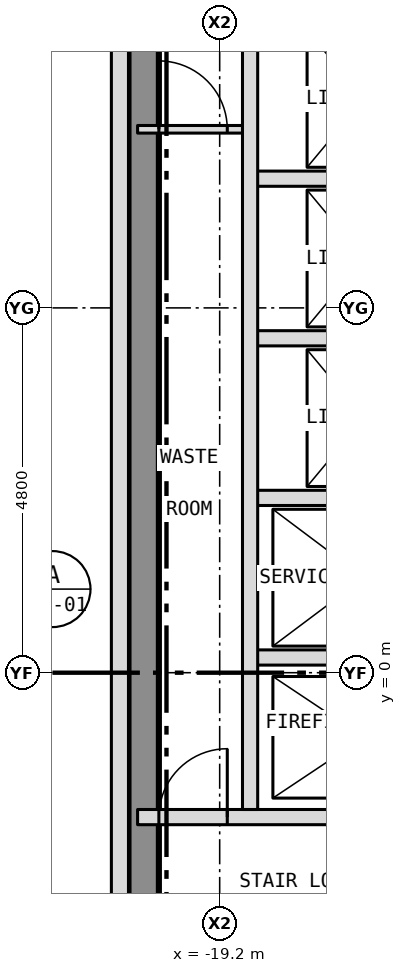
"""IFC4 building model, lengths in metres.
Left out: names, types, materials, properties, quantities, classifications, styles, units other than length and angle.
Written with IfcOpenShell. Run it as: python <this file> out.ifc"""

import sys

from ifc_helpers import new_model, si_unit, direction, frame, frame_2d, origin, place, context, subcontext, project, spatial, rectangle, extrude, element, fill, save


model = new_model("IFC4")
c1 = context("Model", 3, precision=1e-05, world=origin(), true_north=direction((0.0, 1.0)))
c2 = subcontext(c1, "Body", "Model", "MODEL_VIEW")
j1 = project(units=[si_unit("LENGTHUNIT", "METRE"), si_unit("PLANEANGLEUNIT", "RADIAN")], contexts=[c1])
p1 = place(None, origin())
s1 = spatial("IfcSite", under=j1, at=p1, CompositionType="ELEMENT")
p2 = place(p1, origin())
s2 = spatial("IfcBuilding", under=s1, at=p2, CompositionType="ELEMENT")
p3 = place(p2, frame((0.0, 0.0, 265.5)))
s3 = spatial("IfcBuildingStorey", under=s2, at=p3, CompositionType="ELEMENT", Elevation=265.5)
p4 = place(p3, frame((-20.2, -10.8, 0.0), z_axis=(0.0, 0.0, 1.0), x_axis=(0.0, 1.0, 0.0)))
e1 = element("IfcWall", 1, at=p4, inside=s3, PredefinedType="SHEAR", context=c2, shape_type="SweptSolid", body=[
    extrude(rectangle(XDim=21.6, YDim=0.4, at=frame_2d((10.8, 0.0))), origin(), (0.0, 0.0, 1.0), 3.25),
])
p5 = place(p3, frame((-20.512, 11.15, 0.0), z_axis=(0.0, 0.0, 1.0), x_axis=(0.0, -1.0, 0.0)))
e2 = element("IfcWall", 2, at=p5, inside=s3, PredefinedType="SOLIDWALL", context=c2, shape_type="SweptSolid", body=[
    extrude(rectangle(XDim=22.3, YDim=0.225, at=frame_2d((11.15, 0.0))), origin(), (0.0, 0.0, 1.0), 3.5),
])
p6 = place(p5, frame((18.4, 0.0, 1.0)))
e3 = element("IfcOpeningElement", 3, at=p6, cuts=e2, PredefinedType="OPENING", context=c2, shape_type="SweptSolid", body=[
    extrude(rectangle(XDim=0.6, YDim=1.5, at=frame_2d((0.3, 0.75))), frame((0.0, 0.125, 0.0), z_axis=(0.0, -1.0, 0.0), x_axis=(1.0, 0.0, 0.0)), (0.0, 0.0, 1.0), 0.249),
])
p7 = place(p3, frame((-20.28, -1.9, 0.0), z_axis=(0.0, 0.0, 1.0), x_axis=(1.0, 0.0, 0.0)))
e4 = element("IfcWall", 4, at=p7, inside=s3, PredefinedType="PARTITIONING", context=c2, shape_type="SweptSolid", body=[
    extrude(rectangle(XDim=4.36, YDim=0.2, at=frame_2d((2.18, 0.0))), origin(), (0.0, 0.0, 1.0), 3.25),
])
p8 = place(p7, frame((0.28, 0.0, 0.0)))
e5 = element("IfcOpeningElement", 5, at=p8, cuts=e4, PredefinedType="OPENING", context=c2, shape_type="SweptSolid", body=[
    extrude(rectangle(XDim=0.9, YDim=2.1, at=frame_2d((0.45, 1.05))), frame((0.0, 0.112, 0.0), z_axis=(0.0, -1.0, 0.0), x_axis=(1.0, 0.0, 0.0)), (0.0, 0.0, 1.0), 0.224),
])
for number, where, z_axis, x_axis in (
    (6, (-18.8, 0.2, 0.0), (0.0, 0.0, 1.0), (1.0, 0.0, 0.0)),
    (7, (-18.8, 2.3, 0.0), (0.0, 0.0, 1.0), (1.0, 0.0, 0.0)),
    (8, (-18.8, 4.4, 0.0), (0.0, 0.0, 1.0), (1.0, 0.0, 0.0)),
    (9, (-18.8, 6.5, 0.0), (0.0, 0.0, 1.0), (1.0, 0.0, 0.0)),
):
    element("IfcWall", number, at=place(p3, frame(where, z_axis=z_axis, x_axis=x_axis)), inside=s3, PredefinedType="PARTITIONING", context=c2, shape_type="SweptSolid", body=[
        extrude(rectangle(XDim=2.88, YDim=0.2, at=frame_2d((1.44, 0.0))), origin(), (0.0, 0.0, 1.0), 3.25),
    ])
p9 = place(p3, frame((-20.28, 7.15, 0.0), z_axis=(0.0, 0.0, 1.0), x_axis=(1.0, 0.0, 0.0)))
e10 = element("IfcWall", 10, at=p9, inside=s3, PredefinedType="PARTITIONING", context=c2, shape_type="SweptSolid", body=[
    extrude(rectangle(XDim=1.48, YDim=0.1, at=frame_2d((0.74, 0.0))), origin(), (0.0, 0.0, 1.0), 3.25),
])
p10 = place(p9, frame((0.28, 0.0, 0.0)))
e11 = element("IfcOpeningElement", 11, at=p10, cuts=e10, PredefinedType="OPENING", context=c2, shape_type="SweptSolid", body=[
    extrude(rectangle(XDim=0.9, YDim=2.1, at=frame_2d((0.45, 1.05))), frame((0.0, 0.062, 0.0), z_axis=(0.0, -1.0, 0.0), x_axis=(1.0, 0.0, 0.0)), (0.0, 0.0, 1.0), 0.124),
])
p11 = place(p3, frame((-18.8, -1.8, 0.0), z_axis=(0.0, 0.0, 1.0), x_axis=(0.0, 1.0, 0.0)))
e12 = element("IfcWall", 12, at=p11, inside=s3, PredefinedType="PARTITIONING", context=c2, shape_type="SweptSolid", body=[
    extrude(rectangle(XDim=12.48, YDim=0.2, at=frame_2d((6.24, 0.0))), origin(), (0.0, 0.0, 1.0), 3.25),
])
p12 = place(p8, origin())
e13 = element("IfcDoor", 13, at=p12, inside=s3, OperationType="SINGLE_SWING_RIGHT", PredefinedType="DOOR", context=c2, shape_type="SweptSolid", body=[
    extrude(rectangle(XDim=0.9, YDim=2.1, at=frame_2d((0.45, 1.05))), frame((0.0, 0.025, 0.0), z_axis=(0.0, -1.0, 0.0), x_axis=(1.0, 0.0, 0.0)), (0.0, 0.0, 1.0), 0.05),
])
fill(e5, e13)
p13 = place(p10, origin())
e14 = element("IfcDoor", 14, at=p13, inside=s3, OperationType="SINGLE_SWING_LEFT", PredefinedType="DOOR", context=c2, shape_type="SweptSolid", body=[
    extrude(rectangle(XDim=0.9, YDim=2.1, at=frame_2d((0.45, 1.05))), frame((0.0, 0.025, 0.0), z_axis=(0.0, -1.0, 0.0), x_axis=(1.0, 0.0, 0.0)), (0.0, 0.0, 1.0), 0.05),
])
fill(e11, e14)
save(model, sys.argv[1])
